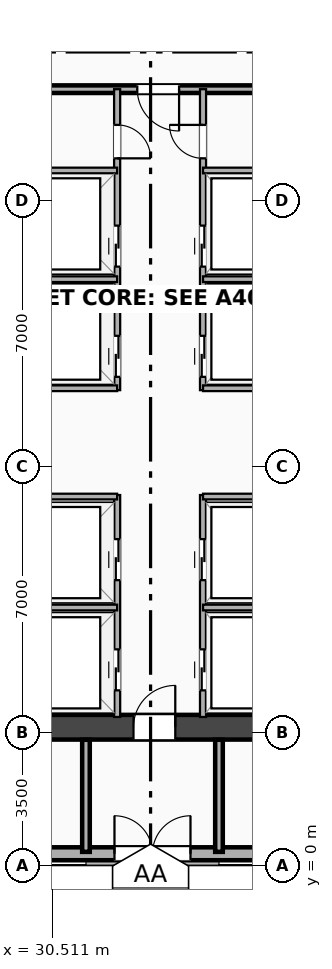
"""IFC4 building model, lengths in metres.
Left out: names, types, materials, properties, quantities, classifications, styles, units other than length and angle.
Written with IfcOpenShell. Run it as: python <this file> out.ifc"""

import sys

from ifc_helpers import new_model, si_unit, direction, frame, frame_2d, origin, place, context, subcontext, project, spatial, rectangle, extrude, element, fill, save


model = new_model("IFC4")
c1 = context("Model", 3, precision=1e-05, world=origin(), true_north=direction((0.0, 1.0)))
c2 = subcontext(c1, "Body", "Model", "MODEL_VIEW")
j1 = project(units=[si_unit("LENGTHUNIT", "METRE"), si_unit("PLANEANGLEUNIT", "RADIAN")], contexts=[c1])
p1 = place(None, origin())
s1 = spatial("IfcSite", under=j1, at=p1, CompositionType="ELEMENT")
p2 = place(p1, origin())
s2 = spatial("IfcBuilding", under=s1, at=p2, CompositionType="ELEMENT")
p3 = place(p2, origin())
s3 = spatial("IfcBuildingStorey", under=s2, at=p3, CompositionType="ELEMENT", Elevation=0.0)
p4 = place(p3, frame((20.3, 3.63, 0.0), z_axis=(0.0, 0.0, 1.0), x_axis=(1.0, 0.0, 0.0)))
e1 = element("IfcWall", 1, at=p4, inside=s3, PredefinedType="SHEAR", context=c2, shape_type="SweptSolid", body=[
    extrude(rectangle(XDim=24.5, YDim=0.65, at=frame_2d((12.25, 0.0))), origin(), (0.0, 0.0, 1.0), 5.1),
])
p5 = place(p4, frame((13.45, 0.0, 0.0), z_axis=(0.0, 0.0, 1.0), x_axis=(-1.0, 0.0, 0.0)))
e2 = element("IfcOpeningElement", 2, at=p5, cuts=e1, PredefinedType="OPENING", context=c2, shape_type="SweptSolid", body=[
    extrude(rectangle(XDim=1.1, YDim=2.15, at=frame_2d((0.55, 1.075))), frame((0.0, 0.335, 0.0), z_axis=(0.0, -1.0, 0.0), x_axis=(1.0, 0.0, 0.0)), (0.0, 0.0, 1.0), 0.67),
])
p6 = place(p3, frame((-4.7, 0.3, 0.0), z_axis=(0.0, 0.0, 1.0), x_axis=(1.0, 0.0, 0.0)))
e3 = element("IfcWall", 3, at=p6, inside=s3, PredefinedType="SOLIDWALL", context=c2, shape_type="SweptSolid", body=[
    extrude(rectangle(XDim=83.4, YDim=0.34, at=frame_2d((41.7, 0.0))), origin(), (0.0, 0.0, 1.0), 5.1),
])
p7 = place(p6, frame((24.78, 0.0, 0.0), z_axis=(0.0, 0.0, 1.0), x_axis=(-1.0, 0.0, 0.0)))
e4 = element("IfcOpeningElement", 4, at=p7, cuts=e3, PredefinedType="OPENING", context=c2, shape_type="SweptSolid", body=[
    extrude(rectangle(XDim=2.0, YDim=2.4, at=frame_2d((1.0, 1.2))), frame((0.0, 0.18, 0.0), z_axis=(0.0, -1.0, 0.0), x_axis=(1.0, 0.0, 0.0)), (0.0, 0.0, 1.0), 0.36),
])
p8 = place(p6, frame((38.85, 0.0, 0.0), z_axis=(0.0, 0.0, 1.0), x_axis=(-1.0, 0.0, 0.0)))
e5 = element("IfcOpeningElement", 5, at=p8, cuts=e3, PredefinedType="OPENING", context=c2, shape_type="SweptSolid", body=[
    extrude(rectangle(XDim=2.0, YDim=2.4, at=frame_2d((1.0, 1.2))), frame((0.0, 0.18, 0.0), z_axis=(0.0, -1.0, 0.0), x_axis=(1.0, 0.0, 0.0)), (0.0, 0.0, 1.0), 0.36),
])
p9 = place(p6, frame((57.35, 0.0, 0.0), z_axis=(0.0, 0.0, 1.0), x_axis=(-1.0, 0.0, 0.0)))
e6 = element("IfcOpeningElement", 6, at=p9, cuts=e3, PredefinedType="OPENING", context=c2, shape_type="SweptSolid", body=[
    extrude(rectangle(XDim=2.0, YDim=2.4, at=frame_2d((1.0, 1.2))), frame((0.0, 0.18, 0.0), z_axis=(0.0, -1.0, 0.0), x_axis=(1.0, 0.0, 0.0)), (0.0, 0.0, 1.0), 0.36),
])
p10 = place(p6, frame((81.0, 0.0, 0.0), z_axis=(0.0, 0.0, 1.0), x_axis=(-1.0, 0.0, 0.0)))
e7 = element("IfcOpeningElement", 7, at=p10, cuts=e3, PredefinedType="OPENING", context=c2, shape_type="SweptSolid", body=[
    extrude(rectangle(XDim=3.8, YDim=3.4, at=frame_2d((1.9, 1.7))), frame((0.0, 0.18, 0.0), z_axis=(0.0, -1.0, 0.0), x_axis=(1.0, 0.0, 0.0)), (0.0, 0.0, 1.0), 0.36),
])
p11 = place(p6, frame((9.9, 0.0, 0.9)))
e8 = element("IfcOpeningElement", 8, at=p11, cuts=e3, PredefinedType="OPENING", context=c2, shape_type="SweptSolid", body=[
    extrude(rectangle(XDim=2.4, YDim=2.6, at=frame_2d((1.2, 1.3))), frame((0.0, 0.18, 0.0), z_axis=(0.0, -1.0, 0.0), x_axis=(1.0, 0.0, 0.0)), (0.0, 0.0, 1.0), 0.36),
])
p12 = place(p6, frame((14.3, 0.0, 0.9)))
e9 = element("IfcOpeningElement", 9, at=p12, cuts=e3, PredefinedType="OPENING", context=c2, shape_type="SweptSolid", body=[
    extrude(rectangle(XDim=2.4, YDim=2.6, at=frame_2d((1.2, 1.3))), frame((0.0, 0.18, 0.0), z_axis=(0.0, -1.0, 0.0), x_axis=(1.0, 0.0, 0.0)), (0.0, 0.0, 1.0), 0.36),
])
p13 = place(p6, frame((27.5, 0.0, 0.9)))
e10 = element("IfcOpeningElement", 10, at=p13, cuts=e3, PredefinedType="OPENING", context=c2, shape_type="SweptSolid", body=[
    extrude(rectangle(XDim=2.4, YDim=2.6, at=frame_2d((1.2, 1.3))), frame((0.0, 0.18, 0.0), z_axis=(0.0, -1.0, 0.0), x_axis=(1.0, 0.0, 0.0)), (0.0, 0.0, 1.0), 0.36),
])
p14 = place(p6, frame((45.9, 0.0, 0.9)))
e11 = element("IfcOpeningElement", 11, at=p14, cuts=e3, PredefinedType="OPENING", context=c2, shape_type="SweptSolid", body=[
    extrude(rectangle(XDim=2.4, YDim=2.6, at=frame_2d((1.2, 1.3))), frame((0.0, 0.18, 0.0), z_axis=(0.0, -1.0, 0.0), x_axis=(1.0, 0.0, 0.0)), (0.0, 0.0, 1.0), 0.36),
])
p15 = place(p6, frame((61.5, 0.0, 0.9)))
e12 = element("IfcOpeningElement", 12, at=p15, cuts=e3, PredefinedType="OPENING", context=c2, shape_type="SweptSolid", body=[
    extrude(rectangle(XDim=2.4, YDim=2.6, at=frame_2d((1.2, 1.3))), frame((0.0, 0.18, 0.0), z_axis=(0.0, -1.0, 0.0), x_axis=(1.0, 0.0, 0.0)), (0.0, 0.0, 1.0), 0.36),
])
p16 = place(p6, frame((68.3, 0.0, 0.9)))
e13 = element("IfcOpeningElement", 13, at=p16, cuts=e3, PredefinedType="OPENING", context=c2, shape_type="SweptSolid", body=[
    extrude(rectangle(XDim=2.4, YDim=2.6, at=frame_2d((1.2, 1.3))), frame((0.0, 0.18, 0.0), z_axis=(0.0, -1.0, 0.0), x_axis=(1.0, 0.0, 0.0)), (0.0, 0.0, 1.0), 0.36),
])
p17 = place(p3, frame((29.2, 20.42, 0.0), z_axis=(0.0, 0.0, 1.0), x_axis=(1.0, 0.0, 0.0)))
e14 = element("IfcWall", 14, at=p17, inside=s3, PredefinedType="PARTITIONING", context=c2, shape_type="SweptSolid", body=[
    extrude(rectangle(XDim=7.8, YDim=0.2, at=frame_2d((3.9, 0.0))), origin(), (0.0, 0.0, 1.0), 2.735),
])
p18 = place(p17, frame((3.55, 0.0, 0.0)))
e15 = element("IfcOpeningElement", 15, at=p18, cuts=e14, PredefinedType="OPENING", context=c2, shape_type="SweptSolid", body=[
    extrude(rectangle(XDim=1.1, YDim=2.15, at=frame_2d((0.55, 1.075))), frame((0.0, 0.11, 0.0), z_axis=(0.0, -1.0, 0.0), x_axis=(1.0, 0.0, 0.0)), (0.0, 0.0, 1.0), 0.22),
])
p19 = place(p3, frame((32.22, 3.9, 0.0), z_axis=(0.0, 0.0, 1.0), x_axis=(0.0, 1.0, 0.0)))
e16 = element("IfcWall", 16, at=p19, inside=s3, PredefinedType="PARTITIONING", context=c2, shape_type="SweptSolid", body=[
    extrude(rectangle(XDim=5.84, YDim=0.16, at=frame_2d((2.92, 0.0))), origin(), (0.0, 0.0, 1.0), 4.164),
])
p20 = place(p19, frame((1.78, 0.0, 0.0), z_axis=(0.0, 0.0, 1.0), x_axis=(-1.0, 0.0, 0.0)))
e17 = element("IfcOpeningElement", 17, at=p20, cuts=e16, PredefinedType="OPENING", context=c2, shape_type="SweptSolid", body=[
    extrude(rectangle(XDim=1.08, YDim=2.16, at=frame_2d((0.54, 1.08))), frame((0.0, 0.09, 0.0), z_axis=(0.0, -1.0, 0.0), x_axis=(1.0, 0.0, 0.0)), (0.0, 0.0, 1.0), 0.18),
])
p21 = place(p19, frame((4.68, 0.0, 0.0), z_axis=(0.0, 0.0, 1.0), x_axis=(-1.0, 0.0, 0.0)))
e18 = element("IfcOpeningElement", 18, at=p21, cuts=e16, PredefinedType="OPENING", context=c2, shape_type="SweptSolid", body=[
    extrude(rectangle(XDim=1.08, YDim=2.16, at=frame_2d((0.54, 1.08))), frame((0.0, 0.09, 0.0), z_axis=(0.0, -1.0, 0.0), x_axis=(1.0, 0.0, 0.0)), (0.0, 0.0, 1.0), 0.18),
])
p22 = place(p3, frame((34.48, 3.9, 0.0), z_axis=(0.0, 0.0, 1.0), x_axis=(0.0, 1.0, 0.0)))
e19 = element("IfcWall", 19, at=p22, inside=s3, PredefinedType="PARTITIONING", context=c2, shape_type="SweptSolid", body=[
    extrude(rectangle(XDim=5.84, YDim=0.16, at=frame_2d((2.92, 0.0))), origin(), (0.0, 0.0, 1.0), 4.164),
])
p23 = place(p22, frame((0.7, 0.0, 0.0)))
e20 = element("IfcOpeningElement", 20, at=p23, cuts=e19, PredefinedType="OPENING", context=c2, shape_type="SweptSolid", body=[
    extrude(rectangle(XDim=1.08, YDim=2.16, at=frame_2d((0.54, 1.08))), frame((0.0, 0.09, 0.0), z_axis=(0.0, -1.0, 0.0), x_axis=(1.0, 0.0, 0.0)), (0.0, 0.0, 1.0), 0.18),
])
p24 = place(p22, frame((3.6, 0.0, 0.0)))
e21 = element("IfcOpeningElement", 21, at=p24, cuts=e19, PredefinedType="OPENING", context=c2, shape_type="SweptSolid", body=[
    extrude(rectangle(XDim=1.08, YDim=2.16, at=frame_2d((0.54, 1.08))), frame((0.0, 0.09, 0.0), z_axis=(0.0, -1.0, 0.0), x_axis=(1.0, 0.0, 0.0)), (0.0, 0.0, 1.0), 0.18),
])
p25 = place(p3, frame((29.45, 6.78, 0.0), z_axis=(0.0, 0.0, 1.0), x_axis=(1.0, 0.0, 0.0)))
e22 = element("IfcWall", 22, at=p25, inside=s3, PredefinedType="PARTITIONING", context=c2, shape_type="SweptSolid", body=[
    extrude(rectangle(XDim=2.77, YDim=0.15, at=frame_2d((1.385, 0.0))), origin(), (0.0, 0.0, 1.0), 4.23),
])
p26 = place(p3, frame((34.48, 6.78, 0.0), z_axis=(0.0, 0.0, 1.0), x_axis=(1.0, 0.0, 0.0)))
e23 = element("IfcWall", 23, at=p26, inside=s3, PredefinedType="PARTITIONING", context=c2, shape_type="SweptSolid", body=[
    extrude(rectangle(XDim=2.27, YDim=0.15, at=frame_2d((1.135, 0.0))), origin(), (0.0, 0.0, 1.0), 4.23),
])
p27 = place(p3, frame((29.45, 9.7, 0.0), z_axis=(0.0, 0.0, 1.0), x_axis=(1.0, 0.0, 0.0)))
e24 = element("IfcWall", 24, at=p27, inside=s3, PredefinedType="PARTITIONING", context=c2, shape_type="SweptSolid", body=[
    extrude(rectangle(XDim=2.77, YDim=0.15, at=frame_2d((1.385, 0.0))), origin(), (0.0, 0.0, 1.0), 4.23),
])
p28 = place(p3, frame((34.48, 9.7, 0.0), z_axis=(0.0, 0.0, 1.0), x_axis=(1.0, 0.0, 0.0)))
e25 = element("IfcWall", 25, at=p28, inside=s3, PredefinedType="PARTITIONING", context=c2, shape_type="SweptSolid", body=[
    extrude(rectangle(XDim=2.27, YDim=0.15, at=frame_2d((1.135, 0.0))), origin(), (0.0, 0.0, 1.0), 4.23),
])
p29 = place(p3, frame((32.22, 12.5, 0.0), z_axis=(0.0, 0.0, 1.0), x_axis=(0.0, 1.0, 0.0)))
e26 = element("IfcWall", 26, at=p29, inside=s3, PredefinedType="PARTITIONING", context=c2, shape_type="SweptSolid", body=[
    extrude(rectangle(XDim=7.92, YDim=0.16, at=frame_2d((3.96, 0.0))), origin(), (0.0, 0.0, 1.0), 4.164),
])
p30 = place(p29, frame((1.43, 0.0, 0.0), z_axis=(0.0, 0.0, 1.0), x_axis=(-1.0, 0.0, 0.0)))
e27 = element("IfcOpeningElement", 27, at=p30, cuts=e26, PredefinedType="OPENING", context=c2, shape_type="SweptSolid", body=[
    extrude(rectangle(XDim=1.08, YDim=2.16, at=frame_2d((0.54, 1.08))), frame((0.0, 0.09, 0.0), z_axis=(0.0, -1.0, 0.0), x_axis=(1.0, 0.0, 0.0)), (0.0, 0.0, 1.0), 0.18),
])
p31 = place(p29, frame((4.33, 0.0, 0.0), z_axis=(0.0, 0.0, 1.0), x_axis=(-1.0, 0.0, 0.0)))
e28 = element("IfcOpeningElement", 28, at=p31, cuts=e26, PredefinedType="OPENING", context=c2, shape_type="SweptSolid", body=[
    extrude(rectangle(XDim=1.08, YDim=2.16, at=frame_2d((0.54, 1.08))), frame((0.0, 0.09, 0.0), z_axis=(0.0, -1.0, 0.0), x_axis=(1.0, 0.0, 0.0)), (0.0, 0.0, 1.0), 0.18),
])
p32 = place(p29, frame((6.1, 0.0, 0.0)))
e29 = element("IfcOpeningElement", 29, at=p32, cuts=e26, PredefinedType="OPENING", context=c2, shape_type="SweptSolid", body=[
    extrude(rectangle(XDim=0.88, YDim=2.08, at=frame_2d((0.44, 1.04))), frame((0.0, 0.09, 0.0), z_axis=(0.0, -1.0, 0.0), x_axis=(1.0, 0.0, 0.0)), (0.0, 0.0, 1.0), 0.18),
])
p33 = place(p3, frame((34.48, 12.5, 0.0), z_axis=(0.0, 0.0, 1.0), x_axis=(0.0, 1.0, 0.0)))
e30 = element("IfcWall", 30, at=p33, inside=s3, PredefinedType="PARTITIONING", context=c2, shape_type="SweptSolid", body=[
    extrude(rectangle(XDim=7.92, YDim=0.16, at=frame_2d((3.96, 0.0))), origin(), (0.0, 0.0, 1.0), 4.164),
])
p34 = place(p33, frame((0.35, 0.0, 0.0)))
e31 = element("IfcOpeningElement", 31, at=p34, cuts=e30, PredefinedType="OPENING", context=c2, shape_type="SweptSolid", body=[
    extrude(rectangle(XDim=1.08, YDim=2.16, at=frame_2d((0.54, 1.08))), frame((0.0, 0.09, 0.0), z_axis=(0.0, -1.0, 0.0), x_axis=(1.0, 0.0, 0.0)), (0.0, 0.0, 1.0), 0.18),
])
p35 = place(p33, frame((3.25, 0.0, 0.0)))
e32 = element("IfcOpeningElement", 32, at=p35, cuts=e30, PredefinedType="OPENING", context=c2, shape_type="SweptSolid", body=[
    extrude(rectangle(XDim=1.08, YDim=2.16, at=frame_2d((0.54, 1.08))), frame((0.0, 0.09, 0.0), z_axis=(0.0, -1.0, 0.0), x_axis=(1.0, 0.0, 0.0)), (0.0, 0.0, 1.0), 0.18),
])
p36 = place(p33, frame((6.98, 0.0, 0.0), z_axis=(0.0, 0.0, 1.0), x_axis=(-1.0, 0.0, 0.0)))
e33 = element("IfcOpeningElement", 33, at=p36, cuts=e30, PredefinedType="OPENING", context=c2, shape_type="SweptSolid", body=[
    extrude(rectangle(XDim=0.88, YDim=2.08, at=frame_2d((0.44, 1.04))), frame((0.0, 0.09, 0.0), z_axis=(0.0, -1.0, 0.0), x_axis=(1.0, 0.0, 0.0)), (0.0, 0.0, 1.0), 0.18),
])
p37 = place(p3, frame((29.45, 12.55, 0.0), z_axis=(0.0, 0.0, 1.0), x_axis=(1.0, 0.0, 0.0)))
e34 = element("IfcWall", 34, at=p37, inside=s3, PredefinedType="PARTITIONING", context=c2, shape_type="SweptSolid", body=[
    extrude(rectangle(XDim=2.77, YDim=0.15, at=frame_2d((1.385, 0.0))), origin(), (0.0, 0.0, 1.0), 4.23),
])
p38 = place(p3, frame((34.48, 12.55, 0.0), z_axis=(0.0, 0.0, 1.0), x_axis=(1.0, 0.0, 0.0)))
e35 = element("IfcWall", 35, at=p38, inside=s3, PredefinedType="PARTITIONING", context=c2, shape_type="SweptSolid", body=[
    extrude(rectangle(XDim=2.27, YDim=0.15, at=frame_2d((1.135, 0.0))), origin(), (0.0, 0.0, 1.0), 4.23),
])
p39 = place(p3, frame((29.45, 15.42, 0.0), z_axis=(0.0, 0.0, 1.0), x_axis=(1.0, 0.0, 0.0)))
e36 = element("IfcWall", 36, at=p39, inside=s3, PredefinedType="PARTITIONING", context=c2, shape_type="SweptSolid", body=[
    extrude(rectangle(XDim=2.77, YDim=0.15, at=frame_2d((1.385, 0.0))), origin(), (0.0, 0.0, 1.0), 4.23),
])
p40 = place(p3, frame((34.48, 15.42, 0.0), z_axis=(0.0, 0.0, 1.0), x_axis=(1.0, 0.0, 0.0)))
e37 = element("IfcWall", 37, at=p40, inside=s3, PredefinedType="PARTITIONING", context=c2, shape_type="SweptSolid", body=[
    extrude(rectangle(XDim=2.27, YDim=0.15, at=frame_2d((1.135, 0.0))), origin(), (0.0, 0.0, 1.0), 4.23),
])
p41 = place(p3, frame((29.45, 18.28, 0.0), z_axis=(0.0, 0.0, 1.0), x_axis=(1.0, 0.0, 0.0)))
e38 = element("IfcWall", 38, at=p41, inside=s3, PredefinedType="PARTITIONING", context=c2, shape_type="SweptSolid", body=[
    extrude(rectangle(XDim=2.77, YDim=0.15, at=frame_2d((1.385, 0.0))), origin(), (0.0, 0.0, 1.0), 4.23),
])
p42 = place(p3, frame((34.48, 18.28, 0.0), z_axis=(0.0, 0.0, 1.0), x_axis=(1.0, 0.0, 0.0)))
e39 = element("IfcWall", 39, at=p42, inside=s3, PredefinedType="PARTITIONING", context=c2, shape_type="SweptSolid", body=[
    extrude(rectangle(XDim=2.27, YDim=0.15, at=frame_2d((1.135, 0.0))), origin(), (0.0, 0.0, 1.0), 4.23),
])
for number, where, z_axis, x_axis in (
    (40, (31.4, 0.35, 0.0), (0.0, 0.0, 1.0), (0.0, 1.0, 0.0)),
    (41, (34.9, 0.35, 0.0), (0.0, 0.0, 1.0), (0.0, 1.0, 0.0)),
):
    element("IfcWall", number, at=place(p3, frame(where, z_axis=z_axis, x_axis=x_axis)), inside=s3, PredefinedType="PARTITIONING", context=c2, shape_type="SweptSolid", body=[
        extrude(rectangle(XDim=2.95, YDim=0.2, at=frame_2d((1.475, 0.0))), origin(), (0.0, 0.0, 1.0), 4.164),
    ])
p43 = place(p8, origin())
e42 = element("IfcDoor", 42, at=p43, inside=s3, OperationType="DOUBLE_DOOR_SINGLE_SWING", PredefinedType="DOOR", context=c2, shape_type="SweptSolid", body=[
    extrude(rectangle(XDim=2.0, YDim=2.4, at=frame_2d((1.0, 1.2))), frame((0.0, 0.025, 0.0), z_axis=(0.0, -1.0, 0.0), x_axis=(1.0, 0.0, 0.0)), (0.0, 0.0, 1.0), 0.05),
])
fill(e5, e42)
p44 = place(p5, origin())
e43 = element("IfcDoor", 43, at=p44, inside=s3, OperationType="SINGLE_SWING_RIGHT", PredefinedType="DOOR", context=c2, shape_type="SweptSolid", body=[
    extrude(rectangle(XDim=1.1, YDim=2.15, at=frame_2d((0.55, 1.075))), frame((0.0, 0.025, 0.0), z_axis=(0.0, -1.0, 0.0), x_axis=(1.0, 0.0, 0.0)), (0.0, 0.0, 1.0), 0.05),
])
fill(e2, e43)
p45 = place(p18, origin())
e44 = element("IfcDoor", 44, at=p45, inside=s3, OperationType="SINGLE_SWING_RIGHT", PredefinedType="DOOR", context=c2, shape_type="SweptSolid", body=[
    extrude(rectangle(XDim=1.1, YDim=2.15, at=frame_2d((0.55, 1.075))), frame((0.0, 0.025, 0.0), z_axis=(0.0, -1.0, 0.0), x_axis=(1.0, 0.0, 0.0)), (0.0, 0.0, 1.0), 0.05),
])
fill(e15, e44)
p46 = place(p20, origin())
e45 = element("IfcDoor", 45, at=p46, inside=s3, OperationType="DOUBLE_DOOR_SLIDING", PredefinedType="DOOR", context=c2, shape_type="SweptSolid", body=[
    extrude(rectangle(XDim=1.08, YDim=2.16, at=frame_2d((0.54, 1.08))), frame((0.0, 0.025, 0.0), z_axis=(0.0, -1.0, 0.0), x_axis=(1.0, 0.0, 0.0)), (0.0, 0.0, 1.0), 0.05),
])
fill(e17, e45)
p47 = place(p21, origin())
e46 = element("IfcDoor", 46, at=p47, inside=s3, OperationType="DOUBLE_DOOR_SLIDING", PredefinedType="DOOR", context=c2, shape_type="SweptSolid", body=[
    extrude(rectangle(XDim=1.08, YDim=2.16, at=frame_2d((0.54, 1.08))), frame((0.0, 0.025, 0.0), z_axis=(0.0, -1.0, 0.0), x_axis=(1.0, 0.0, 0.0)), (0.0, 0.0, 1.0), 0.05),
])
fill(e18, e46)
p48 = place(p23, origin())
e47 = element("IfcDoor", 47, at=p48, inside=s3, OperationType="DOUBLE_DOOR_SLIDING", PredefinedType="DOOR", context=c2, shape_type="SweptSolid", body=[
    extrude(rectangle(XDim=1.08, YDim=2.16, at=frame_2d((0.54, 1.08))), frame((0.0, 0.025, 0.0), z_axis=(0.0, -1.0, 0.0), x_axis=(1.0, 0.0, 0.0)), (0.0, 0.0, 1.0), 0.05),
])
fill(e20, e47)
p49 = place(p24, origin())
e48 = element("IfcDoor", 48, at=p49, inside=s3, OperationType="DOUBLE_DOOR_SLIDING", PredefinedType="DOOR", context=c2, shape_type="SweptSolid", body=[
    extrude(rectangle(XDim=1.08, YDim=2.16, at=frame_2d((0.54, 1.08))), frame((0.0, 0.025, 0.0), z_axis=(0.0, -1.0, 0.0), x_axis=(1.0, 0.0, 0.0)), (0.0, 0.0, 1.0), 0.05),
])
fill(e21, e48)
p50 = place(p30, origin())
e49 = element("IfcDoor", 49, at=p50, inside=s3, OperationType="DOUBLE_DOOR_SLIDING", PredefinedType="DOOR", context=c2, shape_type="SweptSolid", body=[
    extrude(rectangle(XDim=1.08, YDim=2.16, at=frame_2d((0.54, 1.08))), frame((0.0, 0.025, 0.0), z_axis=(0.0, -1.0, 0.0), x_axis=(1.0, 0.0, 0.0)), (0.0, 0.0, 1.0), 0.05),
])
fill(e27, e49)
p51 = place(p31, origin())
e50 = element("IfcDoor", 50, at=p51, inside=s3, OperationType="DOUBLE_DOOR_SLIDING", PredefinedType="DOOR", context=c2, shape_type="SweptSolid", body=[
    extrude(rectangle(XDim=1.08, YDim=2.16, at=frame_2d((0.54, 1.08))), frame((0.0, 0.025, 0.0), z_axis=(0.0, -1.0, 0.0), x_axis=(1.0, 0.0, 0.0)), (0.0, 0.0, 1.0), 0.05),
])
fill(e28, e50)
p52 = place(p32, origin())
e51 = element("IfcDoor", 51, at=p52, inside=s3, OperationType="SINGLE_SWING_LEFT", PredefinedType="DOOR", context=c2, shape_type="SweptSolid", body=[
    extrude(rectangle(XDim=0.88, YDim=2.08, at=frame_2d((0.44, 1.04))), frame((0.0, 0.025, 0.0), z_axis=(0.0, -1.0, 0.0), x_axis=(1.0, 0.0, 0.0)), (0.0, 0.0, 1.0), 0.05),
])
fill(e29, e51)
p53 = place(p34, origin())
e52 = element("IfcDoor", 52, at=p53, inside=s3, OperationType="DOUBLE_DOOR_SLIDING", PredefinedType="DOOR", context=c2, shape_type="SweptSolid", body=[
    extrude(rectangle(XDim=1.08, YDim=2.16, at=frame_2d((0.54, 1.08))), frame((0.0, 0.025, 0.0), z_axis=(0.0, -1.0, 0.0), x_axis=(1.0, 0.0, 0.0)), (0.0, 0.0, 1.0), 0.05),
])
fill(e31, e52)
p54 = place(p35, origin())
e53 = element("IfcDoor", 53, at=p54, inside=s3, OperationType="DOUBLE_DOOR_SLIDING", PredefinedType="DOOR", context=c2, shape_type="SweptSolid", body=[
    extrude(rectangle(XDim=1.08, YDim=2.16, at=frame_2d((0.54, 1.08))), frame((0.0, 0.025, 0.0), z_axis=(0.0, -1.0, 0.0), x_axis=(1.0, 0.0, 0.0)), (0.0, 0.0, 1.0), 0.05),
])
fill(e32, e53)
p55 = place(p36, origin())
e54 = element("IfcDoor", 54, at=p55, inside=s3, OperationType="SINGLE_SWING_RIGHT", PredefinedType="DOOR", context=c2, shape_type="SweptSolid", body=[
    extrude(rectangle(XDim=0.88, YDim=2.08, at=frame_2d((0.44, 1.04))), frame((0.0, 0.025, 0.0), z_axis=(0.0, -1.0, 0.0), x_axis=(1.0, 0.0, 0.0)), (0.0, 0.0, 1.0), 0.05),
])
fill(e33, e54)
save(model, sys.argv[1])
